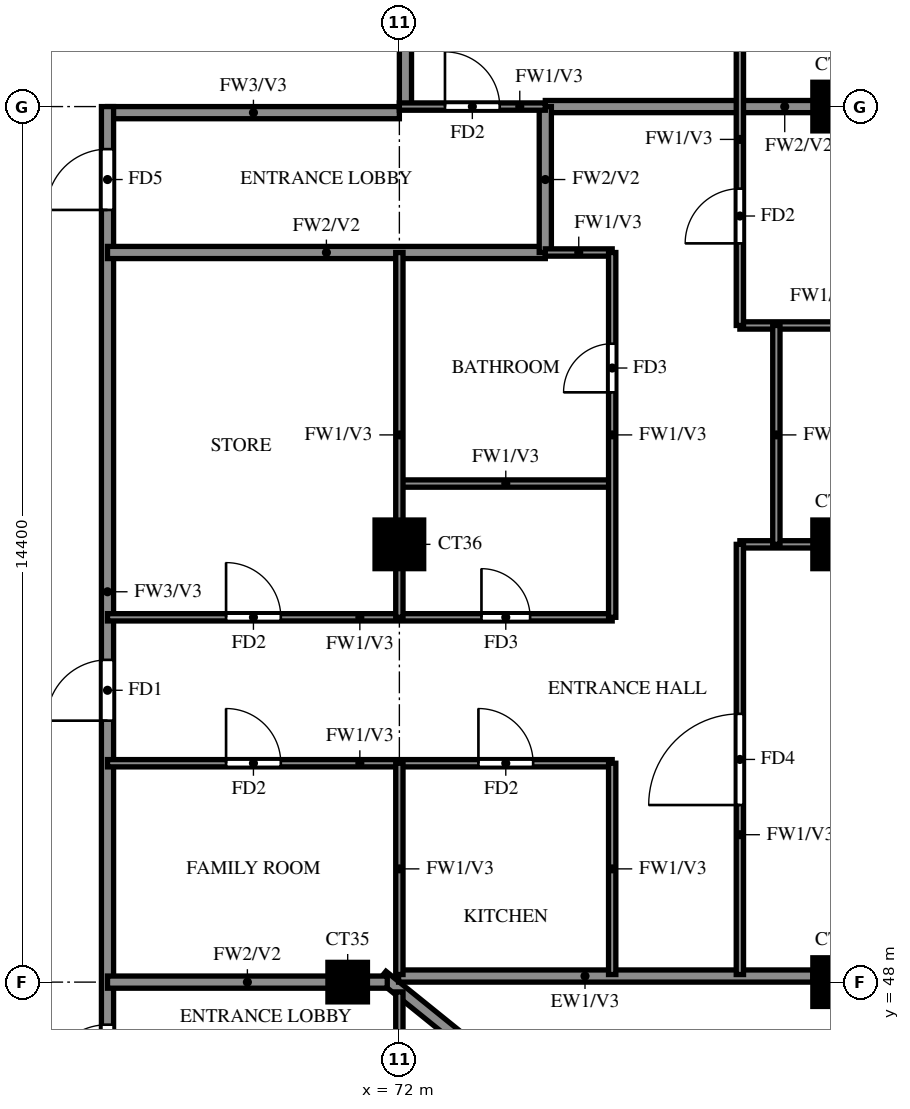
"""IFC4 building model, lengths in metres.
Left out: names, types, materials, properties, quantities, classifications, styles, units other than length and angle.
Written with IfcOpenShell. Run it as: python <this file> out.ifc"""

import sys

from ifc_helpers import new_model, si_unit, direction, frame, frame_2d, origin, origin_2d, place, context, subcontext, project, spatial, rectangle, extrude, source, transform, mapped, element, fill, save


model = new_model("IFC4")
c1 = context("Model", 3, precision=1e-05, world=origin(), true_north=direction((0.0, 1.0)))
c2 = subcontext(c1, "Body", "Model", "MODEL_VIEW")
j1 = project(units=[si_unit("LENGTHUNIT", "METRE"), si_unit("PLANEANGLEUNIT", "RADIAN")], contexts=[c1])
p1 = place(None, origin())
s1 = spatial("IfcSite", under=j1, at=p1, CompositionType="ELEMENT")
p2 = place(p1, origin())
s2 = spatial("IfcBuilding", under=s1, at=p2, CompositionType="ELEMENT")
p3 = place(p2, frame((0.0, 0.0, 236.0)))
s3 = spatial("IfcBuildingStorey", under=s2, at=p3, CompositionType="ELEMENT", Elevation=236.0)
m1 = source(origin(), c2, "Body", "SweptSolid", [
    extrude(rectangle(XDim=0.65, YDim=0.65, at=origin_2d()), origin(), (0.0, 0.0, 1.0), 3.22),
])
p4 = place(p3, frame((71.15, 48.0, 0.0), z_axis=(0.0, 0.0, 1.0), x_axis=(1.0, 0.0, 0.0)))
e1 = element("IfcColumn", 1, at=p4, inside=s3, PredefinedType="COLUMN", context=c2, shape_type="MappedRepresentation", body=[
    mapped(m1, transform((0.0, 0.0, 0.0))),
])
m2 = source(origin(), c2, "Body", "SweptSolid", [
    extrude(rectangle(XDim=0.8, YDim=0.8, at=origin_2d()), origin(), (0.0, 0.0, 1.0), 3.22),
])
for number, where, z_axis, x_axis in (
    (2, (79.2, 48.0, 0.0), (0.0, 0.0, 1.0), (1.0, 0.0, 0.0)),
    (3, (72.0, 55.2, 0.0), (0.0, 0.0, 1.0), (1.0, 0.0, 0.0)),
    (4, (79.2, 55.2, 0.0), (0.0, 0.0, 1.0), (1.0, 0.0, 0.0)),
    (5, (79.2, 62.4, 0.0), (0.0, 0.0, 1.0), (1.0, 0.0, 0.0)),
):
    element("IfcColumn", number, at=place(p3, frame(where, z_axis=z_axis, x_axis=x_axis)), inside=s3, PredefinedType="COLUMN", context=c2, shape_type="MappedRepresentation", body=[
        mapped(m2, transform((0.0, 0.0, 0.0))),
    ])
p5 = place(p3, frame((81.907, 39.87, 0.0), z_axis=(0.0, 0.0, 1.0), x_axis=(-0.777936274417, 0.62834318087, 0.0)))
e6 = element("IfcWall", 6, at=p5, inside=s3, PredefinedType="SOLIDWALL", context=c2, shape_type="SweptSolid", body=[
    extrude(rectangle(XDim=13.099, YDim=0.2, at=frame_2d((6.549, 0.0))), origin(), (0.0, 0.0, 1.0), 3.22),
])
p6 = place(p5, frame((9.938, 0.0, 1.5)))
e7 = element("IfcOpeningElement", 7, at=p6, cuts=e6, PredefinedType="OPENING", context=c2, shape_type="SweptSolid", body=[
    extrude(rectangle(XDim=0.9, YDim=0.9, at=frame_2d((0.45, 0.45))), frame((0.0, 0.11, 0.0), z_axis=(0.0, -1.0, 0.0), x_axis=(1.0, 0.0, 0.0)), (0.0, 0.0, 1.0), 0.22),
])
p7 = place(p3, frame((71.987, 48.1, 0.0), z_axis=(0.0, 0.0, 1.0), x_axis=(1.0, 0.0, 0.0)))
e8 = element("IfcWall", 8, at=p7, inside=s3, PredefinedType="SOLIDWALL", context=c2, shape_type="SweptSolid", body=[
    extrude(rectangle(XDim=6.813, YDim=0.2, at=frame_2d((3.406, 0.0))), origin(), (0.0, 0.0, 1.0), 3.22),
])
p8 = place(p3, frame((67.2, 62.3, 0.0), z_axis=(0.0, 0.0, 1.0), x_axis=(1.0, 0.0, 0.0)))
e9 = element("IfcWall", 9, at=p8, inside=s3, PredefinedType="SOLIDWALL", context=c2, shape_type="SweptSolid", body=[
    extrude(rectangle(XDim=4.8, YDim=0.2, at=frame_2d((2.4, 0.0))), origin(), (0.0, 0.0, 1.0), 3.22),
])
p9 = place(p3, frame((67.2, 45.6, 0.0), z_axis=(0.0, 0.0, 1.0), x_axis=(0.0, 1.0, 0.0)))
e10 = element("IfcWall", 10, at=p9, inside=s3, PredefinedType="SOLIDWALL", context=c2, shape_type="SweptSolid", body=[
    extrude(rectangle(XDim=16.8, YDim=0.2, at=frame_2d((8.4, 0.0))), origin(), (0.0, 0.0, 1.0), 3.22),
])
p10 = place(p9, frame((6.7, 0.0, 0.0)))
e11 = element("IfcOpeningElement", 11, at=p10, cuts=e10, PredefinedType="OPENING", context=c2, shape_type="SweptSolid", body=[
    extrude(rectangle(XDim=1.0, YDim=2.1, at=frame_2d((0.5, 1.05))), frame((0.0, 0.11, 0.0), z_axis=(0.0, -1.0, 0.0), x_axis=(1.0, 0.0, 0.0)), (0.0, 0.0, 1.0), 0.22),
])
p11 = place(p9, frame((15.1, 0.0, 0.0)))
e12 = element("IfcOpeningElement", 12, at=p11, cuts=e10, PredefinedType="OPENING", context=c2, shape_type="SweptSolid", body=[
    extrude(rectangle(XDim=1.0, YDim=2.1, at=frame_2d((0.5, 1.05))), frame((0.0, 0.11, 0.0), z_axis=(0.0, -1.0, 0.0), x_axis=(1.0, 0.0, 0.0)), (0.0, 0.0, 1.0), 0.22),
])
p12 = place(p9, frame((0.7, 0.0, 0.0)))
e13 = element("IfcOpeningElement", 13, at=p12, cuts=e10, PredefinedType="OPENING", context=c2, shape_type="SweptSolid", body=[
    extrude(rectangle(XDim=1.0, YDim=2.1, at=frame_2d((0.5, 1.05))), frame((0.0, 0.11, 0.0), z_axis=(0.0, -1.0, 0.0), x_axis=(1.0, 0.0, 0.0)), (0.0, 0.0, 1.0), 0.22),
])
p13 = place(p3, frame((72.1, 62.4, 0.0), z_axis=(0.0, 0.0, 1.0), x_axis=(0.0, 1.0, 0.0)))
e14 = element("IfcWall", 14, at=p13, inside=s3, PredefinedType="SOLIDWALL", context=c2, shape_type="SweptSolid", body=[
    extrude(rectangle(XDim=15.6, YDim=0.2, at=frame_2d((7.8, 0.0))), origin(), (0.0, 0.0, 1.0), 3.22),
])
p14 = place(p3, frame((67.2, 48.0, 0.0), z_axis=(0.0, 0.0, 1.0), x_axis=(1.0, 0.0, 0.0)))
e15 = element("IfcWall", 15, at=p14, inside=s3, PredefinedType="SOLIDWALL", context=c2, shape_type="SweptSolid", body=[
    extrude(rectangle(XDim=4.601, YDim=0.2, at=frame_2d((2.301, 0.0))), origin(), (0.0, 0.0, 1.0), 3.22),
])
p15 = place(p3, frame((67.2, 60.0, 0.0), z_axis=(0.0, 0.0, 1.0), x_axis=(1.0, 0.0, 0.0)))
e16 = element("IfcWall", 16, at=p15, inside=s3, PredefinedType="SOLIDWALL", context=c2, shape_type="SweptSolid", body=[
    extrude(rectangle(XDim=7.2, YDim=0.2, at=frame_2d((3.6, 0.0))), origin(), (0.0, 0.0, 1.0), 3.22),
])
p16 = place(p3, frame((74.4, 62.4, 0.0), z_axis=(0.0, 0.0, 1.0), x_axis=(1.0, 0.0, 0.0)))
e17 = element("IfcWall", 17, at=p16, inside=s3, PredefinedType="SOLIDWALL", context=c2, shape_type="SweptSolid", body=[
    extrude(rectangle(XDim=7.875, YDim=0.2, at=frame_2d((3.938, 0.0))), origin(), (0.0, 0.0, 1.0), 3.22),
])
p17 = place(p3, frame((74.4, 60.0, 0.0), z_axis=(0.0, 0.0, 1.0), x_axis=(0.0, 1.0, 0.0)))
e18 = element("IfcWall", 18, at=p17, inside=s3, PredefinedType="SOLIDWALL", context=c2, shape_type="SweptSolid", body=[
    extrude(rectangle(XDim=2.4, YDim=0.2, at=frame_2d((1.2, 0.0))), origin(), (0.0, 0.0, 1.0), 3.22),
])
p18 = place(p3, frame((67.2, 51.6, 0.0), z_axis=(0.0, 0.0, 1.0), x_axis=(1.0, 0.0, 0.0)))
e19 = element("IfcWall", 19, at=p18, inside=s3, PredefinedType="PARTITIONING", context=c2, shape_type="SweptSolid", body=[
    extrude(rectangle(XDim=8.3, YDim=0.12, at=frame_2d((4.15, 0.0))), origin(), (0.0, 0.0, 1.0), 3.22),
])
p19 = place(p18, frame((6.1, 0.0, 0.0)))
e20 = element("IfcOpeningElement", 20, at=p19, cuts=e19, PredefinedType="OPENING", context=c2, shape_type="SweptSolid", body=[
    extrude(rectangle(XDim=0.9, YDim=2.1, at=frame_2d((0.45, 1.05))), frame((0.0, 0.07, 0.0), z_axis=(0.0, -1.0, 0.0), x_axis=(1.0, 0.0, 0.0)), (0.0, 0.0, 1.0), 0.14),
])
p20 = place(p18, frame((1.95, 0.0, 0.0)))
e21 = element("IfcOpeningElement", 21, at=p20, cuts=e19, PredefinedType="OPENING", context=c2, shape_type="SweptSolid", body=[
    extrude(rectangle(XDim=0.9, YDim=2.1, at=frame_2d((0.45, 1.05))), frame((0.0, 0.07, 0.0), z_axis=(0.0, -1.0, 0.0), x_axis=(1.0, 0.0, 0.0)), (0.0, 0.0, 1.0), 0.14),
])
p21 = place(p3, frame((67.2, 54.0, 0.0), z_axis=(0.0, 0.0, 1.0), x_axis=(1.0, 0.0, 0.0)))
e22 = element("IfcWall", 22, at=p21, inside=s3, PredefinedType="PARTITIONING", context=c2, shape_type="SweptSolid", body=[
    extrude(rectangle(XDim=8.3, YDim=0.12, at=frame_2d((4.15, 0.0))), origin(), (0.0, 0.0, 1.0), 3.22),
])
p22 = place(p21, frame((6.15, 0.0, 0.0)))
e23 = element("IfcOpeningElement", 23, at=p22, cuts=e22, PredefinedType="OPENING", context=c2, shape_type="SweptSolid", body=[
    extrude(rectangle(XDim=0.8, YDim=2.1, at=frame_2d((0.4, 1.05))), frame((0.0, 0.07, 0.0), z_axis=(0.0, -1.0, 0.0), x_axis=(1.0, 0.0, 0.0)), (0.0, 0.0, 1.0), 0.14),
])
p23 = place(p21, frame((1.95, 0.0, 0.0)))
e24 = element("IfcOpeningElement", 24, at=p23, cuts=e22, PredefinedType="OPENING", context=c2, shape_type="SweptSolid", body=[
    extrude(rectangle(XDim=0.9, YDim=2.1, at=frame_2d((0.45, 1.05))), frame((0.0, 0.07, 0.0), z_axis=(0.0, -1.0, 0.0), x_axis=(1.0, 0.0, 0.0)), (0.0, 0.0, 1.0), 0.14),
])
p24 = place(p3, frame((77.6, 55.2, 0.0), z_axis=(0.0, 0.0, 1.0), x_axis=(1.0, 0.0, 0.0)))
e25 = element("IfcWall", 25, at=p24, inside=s3, PredefinedType="PARTITIONING", context=c2, shape_type="SweptSolid", body=[
    extrude(rectangle(XDim=4.675, YDim=0.12, at=frame_2d((2.337, 0.0))), origin(), (0.0, 0.0, 1.0), 3.22),
])
p25 = place(p3, frame((72.0, 56.2, 0.0), z_axis=(0.0, 0.0, 1.0), x_axis=(1.0, 0.0, 0.0)))
e26 = element("IfcWall", 26, at=p25, inside=s3, PredefinedType="PARTITIONING", context=c2, shape_type="SweptSolid", body=[
    extrude(rectangle(XDim=3.5, YDim=0.12, at=frame_2d((1.75, 0.0))), origin(), (0.0, 0.0, 1.0), 3.22),
])
p26 = place(p3, frame((77.6, 58.8, 0.0), z_axis=(0.0, 0.0, 1.0), x_axis=(1.0, 0.0, 0.0)))
e27 = element("IfcWall", 27, at=p26, inside=s3, PredefinedType="PARTITIONING", context=c2, shape_type="SweptSolid", body=[
    extrude(rectangle(XDim=4.675, YDim=0.12, at=frame_2d((2.337, 0.0))), origin(), (0.0, 0.0, 1.0), 2.32),
])
p27 = place(p26, frame((2.238, 0.0, 0.0)))
e28 = element("IfcOpeningElement", 28, at=p27, cuts=e27, PredefinedType="OPENING", context=c2, shape_type="SweptSolid", body=[
    extrude(rectangle(XDim=0.8, YDim=2.1, at=frame_2d((0.4, 1.05))), frame((0.0, 0.07, 0.0), z_axis=(0.0, -1.0, 0.0), x_axis=(1.0, 0.0, 0.0)), (0.0, 0.0, 1.0), 0.14),
])
p28 = place(p3, frame((74.4, 60.0, 0.0), z_axis=(0.0, 0.0, 1.0), x_axis=(1.0, 0.0, 0.0)))
e29 = element("IfcWall", 29, at=p28, inside=s3, PredefinedType="PARTITIONING", context=c2, shape_type="SweptSolid", body=[
    extrude(rectangle(XDim=1.1, YDim=0.12, at=frame_2d((0.55, 0.0))), origin(), (0.0, 0.0, 1.0), 3.22),
])
p29 = place(p3, frame((72.0, 62.4, 0.0), z_axis=(0.0, 0.0, 1.0), x_axis=(1.0, 0.0, 0.0)))
e30 = element("IfcWall", 30, at=p29, inside=s3, PredefinedType="PARTITIONING", context=c2, shape_type="SweptSolid", body=[
    extrude(rectangle(XDim=2.4, YDim=0.12, at=frame_2d((1.2, 0.0))), origin(), (0.0, 0.0, 1.0), 3.22),
])
p30 = place(p29, frame((0.75, 0.0, 0.0)))
e31 = element("IfcOpeningElement", 31, at=p30, cuts=e30, PredefinedType="OPENING", context=c2, shape_type="SweptSolid", body=[
    extrude(rectangle(XDim=0.9, YDim=2.1, at=frame_2d((0.45, 1.05))), frame((0.0, 0.07, 0.0), z_axis=(0.0, -1.0, 0.0), x_axis=(1.0, 0.0, 0.0)), (0.0, 0.0, 1.0), 0.14),
])
p31 = place(p3, frame((72.0, 39.725, 0.0), z_axis=(0.0, 0.0, 1.0), x_axis=(0.0, 1.0, 0.0)))
e32 = element("IfcWall", 32, at=p31, inside=s3, PredefinedType="PARTITIONING", context=c2, shape_type="SweptSolid", body=[
    extrude(rectangle(XDim=8.114, YDim=0.12, at=frame_2d((4.057, 0.0))), origin(), (0.0, 0.0, 1.0), 2.32),
])
p32 = place(p31, frame((1.788, 0.0, 0.0)))
e33 = element("IfcOpeningElement", 33, at=p32, cuts=e32, PredefinedType="OPENING", context=c2, shape_type="SweptSolid", body=[
    extrude(rectangle(XDim=1.5, YDim=2.1, at=frame_2d((0.75, 1.05))), frame((0.0, 0.07, 0.0), z_axis=(0.0, -1.0, 0.0), x_axis=(1.0, 0.0, 0.0)), (0.0, 0.0, 1.0), 0.14),
])
p33 = place(p31, frame((4.575, 0.0, 0.0)))
e34 = element("IfcOpeningElement", 34, at=p33, cuts=e32, PredefinedType="OPENING", context=c2, shape_type="SweptSolid", body=[
    extrude(rectangle(XDim=0.8, YDim=2.1, at=frame_2d((0.4, 1.05))), frame((0.0, 0.07, 0.0), z_axis=(0.0, -1.0, 0.0), x_axis=(1.0, 0.0, 0.0)), (0.0, 0.0, 1.0), 0.14),
])
p34 = place(p3, frame((72.0, 48.125, 0.0), z_axis=(0.0, 0.0, 1.0), x_axis=(0.0, 1.0, 0.0)))
e35 = element("IfcWall", 35, at=p34, inside=s3, PredefinedType="PARTITIONING", context=c2, shape_type="SweptSolid", body=[
    extrude(rectangle(XDim=3.475, YDim=0.12, at=frame_2d((1.738, 0.0))), origin(), (0.0, 0.0, 1.0), 3.22),
])
p35 = place(p3, frame((72.0, 54.0, 0.0), z_axis=(0.0, 0.0, 1.0), x_axis=(0.0, 1.0, 0.0)))
e36 = element("IfcWall", 36, at=p35, inside=s3, PredefinedType="PARTITIONING", context=c2, shape_type="SweptSolid", body=[
    extrude(rectangle(XDim=6.0, YDim=0.12, at=frame_2d((3.0, 0.0))), origin(), (0.0, 0.0, 1.0), 3.22),
])
p36 = place(p3, frame((75.5, 48.125, 0.0), z_axis=(0.0, 0.0, 1.0), x_axis=(0.0, 1.0, 0.0)))
e37 = element("IfcWall", 37, at=p36, inside=s3, PredefinedType="PARTITIONING", context=c2, shape_type="SweptSolid", body=[
    extrude(rectangle(XDim=3.475, YDim=0.12, at=frame_2d((1.738, 0.0))), origin(), (0.0, 0.0, 1.0), 3.22),
])
p37 = place(p3, frame((75.5, 54.0, 0.0), z_axis=(0.0, 0.0, 1.0), x_axis=(0.0, 1.0, 0.0)))
e38 = element("IfcWall", 38, at=p37, inside=s3, PredefinedType="PARTITIONING", context=c2, shape_type="SweptSolid", body=[
    extrude(rectangle(XDim=6.0, YDim=0.12, at=frame_2d((3.0, 0.0))), origin(), (0.0, 0.0, 1.0), 3.22),
])
p38 = place(p37, frame((3.7, 0.0, 0.0)))
e39 = element("IfcOpeningElement", 39, at=p38, cuts=e38, PredefinedType="OPENING", context=c2, shape_type="SweptSolid", body=[
    extrude(rectangle(XDim=0.8, YDim=2.1, at=frame_2d((0.4, 1.05))), frame((0.0, 0.07, 0.0), z_axis=(0.0, -1.0, 0.0), x_axis=(1.0, 0.0, 0.0)), (0.0, 0.0, 1.0), 0.14),
])
p39 = place(p3, frame((77.6, 48.125, 0.0), z_axis=(0.0, 0.0, 1.0), x_axis=(0.0, 1.0, 0.0)))
e40 = element("IfcWall", 40, at=p39, inside=s3, PredefinedType="PARTITIONING", context=c2, shape_type="SweptSolid", body=[
    extrude(rectangle(XDim=7.075, YDim=0.12, at=frame_2d((3.538, 0.0))), origin(), (0.0, 0.0, 1.0), 3.22),
])
p40 = place(p39, frame((2.788, 0.0, 0.0)))
e41 = element("IfcOpeningElement", 41, at=p40, cuts=e40, PredefinedType="OPENING", context=c2, shape_type="SweptSolid", body=[
    extrude(rectangle(XDim=1.5, YDim=2.1, at=frame_2d((0.75, 1.05))), frame((0.0, 0.07, 0.0), z_axis=(0.0, -1.0, 0.0), x_axis=(1.0, 0.0, 0.0)), (0.0, 0.0, 1.0), 0.14),
])
p41 = place(p3, frame((77.6, 58.8, 0.0), z_axis=(0.0, 0.0, 1.0), x_axis=(0.0, 1.0, 0.0)))
e42 = element("IfcWall", 42, at=p41, inside=s3, PredefinedType="PARTITIONING", context=c2, shape_type="SweptSolid", body=[
    extrude(rectangle(XDim=7.2, YDim=0.12, at=frame_2d((3.6, 0.0))), origin(), (0.0, 0.0, 1.0), 3.22),
])
p42 = place(p41, frame((1.35, 0.0, 0.0)))
e43 = element("IfcOpeningElement", 43, at=p42, cuts=e42, PredefinedType="OPENING", context=c2, shape_type="SweptSolid", body=[
    extrude(rectangle(XDim=0.9, YDim=2.1, at=frame_2d((0.45, 1.05))), frame((0.0, 0.07, 0.0), z_axis=(0.0, -1.0, 0.0), x_axis=(1.0, 0.0, 0.0)), (0.0, 0.0, 1.0), 0.14),
])
p43 = place(p41, frame((4.95, 0.0, 0.0)))
e44 = element("IfcOpeningElement", 44, at=p43, cuts=e42, PredefinedType="OPENING", context=c2, shape_type="SweptSolid", body=[
    extrude(rectangle(XDim=0.9, YDim=2.1, at=frame_2d((0.45, 1.05))), frame((0.0, 0.07, 0.0), z_axis=(0.0, -1.0, 0.0), x_axis=(1.0, 0.0, 0.0)), (0.0, 0.0, 1.0), 0.14),
])
p44 = place(p3, frame((78.2, 55.2, 0.0), z_axis=(0.0, 0.0, 1.0), x_axis=(0.0, 1.0, 0.0)))
e45 = element("IfcWall", 45, at=p44, inside=s3, PredefinedType="PARTITIONING", context=c2, shape_type="SweptSolid", body=[
    extrude(rectangle(XDim=3.6, YDim=0.12, at=frame_2d((1.8, 0.0))), origin(), (0.0, 0.0, 1.0), 3.22),
])
p45 = place(p10, origin())
e46 = element("IfcDoor", 46, at=p45, inside=s3, OperationType="SINGLE_SWING_LEFT", PredefinedType="DOOR", context=c2, shape_type="SweptSolid", body=[
    extrude(rectangle(XDim=1.0, YDim=2.1, at=frame_2d((0.5, 1.05))), frame((0.0, 0.025, 0.0), z_axis=(0.0, -1.0, 0.0), x_axis=(1.0, 0.0, 0.0)), (0.0, 0.0, 1.0), 0.05),
])
fill(e11, e46)
p46 = place(p40, origin())
e47 = element("IfcDoor", 47, at=p46, inside=s3, OperationType="SINGLE_SWING_LEFT", PredefinedType="DOOR", context=c2, shape_type="SweptSolid", body=[
    extrude(rectangle(XDim=1.5, YDim=2.1, at=frame_2d((0.75, 1.05))), frame((0.0, 0.025, 0.0), z_axis=(0.0, -1.0, 0.0), x_axis=(1.0, 0.0, 0.0)), (0.0, 0.0, 1.0), 0.05),
])
fill(e41, e47)
p47 = place(p42, origin())
e48 = element("IfcDoor", 48, at=p47, inside=s3, OperationType="SINGLE_SWING_RIGHT", PredefinedType="DOOR", context=c2, shape_type="SweptSolid", body=[
    extrude(rectangle(XDim=0.9, YDim=2.1, at=frame_2d((0.45, 1.05))), frame((0.0, 0.025, 0.0), z_axis=(0.0, -1.0, 0.0), x_axis=(1.0, 0.0, 0.0)), (0.0, 0.0, 1.0), 0.05),
])
fill(e43, e48)
p48 = place(p19, origin())
e49 = element("IfcDoor", 49, at=p48, inside=s3, OperationType="SINGLE_SWING_LEFT", PredefinedType="DOOR", context=c2, shape_type="SweptSolid", body=[
    extrude(rectangle(XDim=0.9, YDim=2.1, at=frame_2d((0.45, 1.05))), frame((0.0, 0.025, 0.0), z_axis=(0.0, -1.0, 0.0), x_axis=(1.0, 0.0, 0.0)), (0.0, 0.0, 1.0), 0.05),
])
fill(e20, e49)
p49 = place(p22, origin())
e50 = element("IfcDoor", 50, at=p49, inside=s3, OperationType="SINGLE_SWING_RIGHT", PredefinedType="DOOR", context=c2, shape_type="SweptSolid", body=[
    extrude(rectangle(XDim=0.8, YDim=2.1, at=frame_2d((0.4, 1.05))), frame((0.0, 0.025, 0.0), z_axis=(0.0, -1.0, 0.0), x_axis=(1.0, 0.0, 0.0)), (0.0, 0.0, 1.0), 0.05),
])
fill(e23, e50)
p50 = place(p38, origin())
e51 = element("IfcDoor", 51, at=p50, inside=s3, OperationType="SINGLE_SWING_LEFT", PredefinedType="DOOR", context=c2, shape_type="SweptSolid", body=[
    extrude(rectangle(XDim=0.8, YDim=2.1, at=frame_2d((0.4, 1.05))), frame((0.0, 0.025, 0.0), z_axis=(0.0, -1.0, 0.0), x_axis=(1.0, 0.0, 0.0)), (0.0, 0.0, 1.0), 0.05),
])
fill(e39, e51)
p51 = place(p20, origin())
e52 = element("IfcDoor", 52, at=p51, inside=s3, OperationType="SINGLE_SWING_LEFT", PredefinedType="DOOR", context=c2, shape_type="SweptSolid", body=[
    extrude(rectangle(XDim=0.9, YDim=2.1, at=frame_2d((0.45, 1.05))), frame((0.0, 0.025, 0.0), z_axis=(0.0, -1.0, 0.0), x_axis=(1.0, 0.0, 0.0)), (0.0, 0.0, 1.0), 0.05),
])
fill(e21, e52)
p52 = place(p23, origin())
e53 = element("IfcDoor", 53, at=p52, inside=s3, OperationType="SINGLE_SWING_RIGHT", PredefinedType="DOOR", context=c2, shape_type="SweptSolid", body=[
    extrude(rectangle(XDim=0.9, YDim=2.1, at=frame_2d((0.45, 1.05))), frame((0.0, 0.025, 0.0), z_axis=(0.0, -1.0, 0.0), x_axis=(1.0, 0.0, 0.0)), (0.0, 0.0, 1.0), 0.05),
])
fill(e24, e53)
p53 = place(p30, origin())
e54 = element("IfcDoor", 54, at=p53, inside=s3, OperationType="SINGLE_SWING_LEFT", PredefinedType="DOOR", context=c2, shape_type="SweptSolid", body=[
    extrude(rectangle(XDim=0.9, YDim=2.1, at=frame_2d((0.45, 1.05))), frame((0.0, 0.025, 0.0), z_axis=(0.0, -1.0, 0.0), x_axis=(1.0, 0.0, 0.0)), (0.0, 0.0, 1.0), 0.05),
])
fill(e31, e54)
p54 = place(p11, origin())
e55 = element("IfcDoor", 55, at=p54, inside=s3, OperationType="SINGLE_SWING_RIGHT", PredefinedType="DOOR", context=c2, shape_type="SweptSolid", body=[
    extrude(rectangle(XDim=1.0, YDim=2.1, at=frame_2d((0.5, 1.05))), frame((0.0, 0.025, 0.0), z_axis=(0.0, -1.0, 0.0), x_axis=(1.0, 0.0, 0.0)), (0.0, 0.0, 1.0), 0.05),
])
fill(e12, e55)
p55 = place(p12, origin())
e56 = element("IfcDoor", 56, at=p55, inside=s3, OperationType="SINGLE_SWING_RIGHT", PredefinedType="DOOR", context=c2, shape_type="SweptSolid", body=[
    extrude(rectangle(XDim=1.0, YDim=2.1, at=frame_2d((0.5, 1.05))), frame((0.0, 0.025, 0.0), z_axis=(0.0, -1.0, 0.0), x_axis=(1.0, 0.0, 0.0)), (0.0, 0.0, 1.0), 0.05),
])
fill(e13, e56)
save(model, sys.argv[1])
